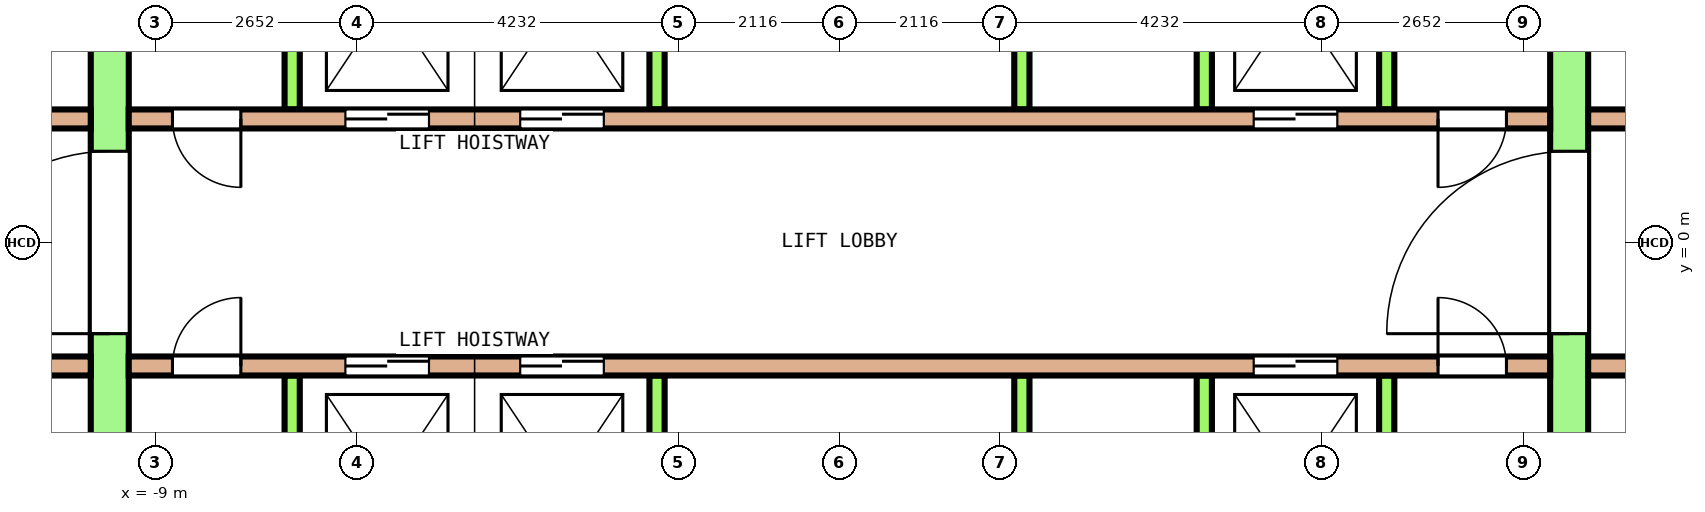
"""IFC4 building model, lengths in metres.
Left out: names, types, materials, properties, quantities, classifications, styles, units other than length and angle.
Written with IfcOpenShell. Run it as: python <this file> out.ifc"""

import sys

from ifc_helpers import new_model, si_unit, direction, frame, frame_2d, origin, place, context, subcontext, project, spatial, rectangle, extrude, element, fill, save


model = new_model("IFC4")
c1 = context("Model", 3, precision=1e-05, world=origin(), true_north=direction((0.0, 1.0)))
c2 = subcontext(c1, "Body", "Model", "MODEL_VIEW")
j1 = project(units=[si_unit("LENGTHUNIT", "METRE"), si_unit("PLANEANGLEUNIT", "RADIAN")], contexts=[c1])
p1 = place(None, origin())
s1 = spatial("IfcSite", under=j1, at=p1, CompositionType="ELEMENT")
p2 = place(p1, origin())
s2 = spatial("IfcBuilding", under=s1, at=p2, CompositionType="ELEMENT")
p3 = place(p2, frame((0.0, 0.0, 171.6)))
s3 = spatial("IfcBuildingStorey", under=s2, at=p3, CompositionType="ELEMENT", Elevation=171.6)
p4 = place(p3, frame((-9.6, -7.75, 0.0), z_axis=(0.0, 0.0, 1.0), x_axis=(0.0, 1.0, 0.0)))
e1 = element("IfcWall", 1, at=p4, inside=s3, PredefinedType="SHEAR", context=c2, shape_type="SweptSolid", body=[
    extrude(rectangle(XDim=15.5, YDim=0.5, at=frame_2d((7.75, 0.0))), origin(), (0.0, 0.0, 1.0), 4.1),
])
p5 = place(p4, frame((6.55, 0.0, 0.0)))
e2 = element("IfcOpeningElement", 2, at=p5, cuts=e1, PredefinedType="OPENING", context=c2, shape_type="SweptSolid", body=[
    extrude(rectangle(XDim=2.4, YDim=2.1, at=frame_2d((1.2, 1.05))), frame((0.0, 0.26, 0.0), z_axis=(0.0, -1.0, 0.0), x_axis=(1.0, 0.0, 0.0)), (0.0, 0.0, 1.0), 0.52),
])
p6 = place(p4, frame((13.45, 0.0, 0.0)))
e3 = element("IfcOpeningElement", 3, at=p6, cuts=e1, PredefinedType="OPENING", context=c2, shape_type="SweptSolid", body=[
    extrude(rectangle(XDim=1.2, YDim=2.1, at=frame_2d((0.6, 1.05))), frame((0.0, 0.26, 0.0), z_axis=(0.0, -1.0, 0.0), x_axis=(1.0, 0.0, 0.0)), (0.0, 0.0, 1.0), 0.52),
])
p7 = place(p4, frame((0.85, 0.0, 0.0)))
e4 = element("IfcOpeningElement", 4, at=p7, cuts=e1, PredefinedType="OPENING", context=c2, shape_type="SweptSolid", body=[
    extrude(rectangle(XDim=1.2, YDim=2.1, at=frame_2d((0.6, 1.05))), frame((0.0, 0.26, 0.0), z_axis=(0.0, -1.0, 0.0), x_axis=(1.0, 0.0, 0.0)), (0.0, 0.0, 1.0), 0.52),
])
p8 = place(p3, frame((9.6, -7.75, 0.0), z_axis=(0.0, 0.0, 1.0), x_axis=(0.0, 1.0, 0.0)))
e5 = element("IfcWall", 5, at=p8, inside=s3, PredefinedType="SHEAR", context=c2, shape_type="SweptSolid", body=[
    extrude(rectangle(XDim=15.5, YDim=0.5, at=frame_2d((7.75, 0.0))), origin(), (0.0, 0.0, 1.0), 4.1),
])
p9 = place(p8, frame((6.55, 0.0, 0.0)))
e6 = element("IfcOpeningElement", 6, at=p9, cuts=e5, PredefinedType="OPENING", context=c2, shape_type="SweptSolid", body=[
    extrude(rectangle(XDim=2.4, YDim=2.1, at=frame_2d((1.2, 1.05))), frame((0.0, 0.26, 0.0), z_axis=(0.0, -1.0, 0.0), x_axis=(1.0, 0.0, 0.0)), (0.0, 0.0, 1.0), 0.52),
])
p10 = place(p8, frame((13.45, 0.0, 0.0)))
e7 = element("IfcOpeningElement", 7, at=p10, cuts=e5, PredefinedType="OPENING", context=c2, shape_type="SweptSolid", body=[
    extrude(rectangle(XDim=1.2, YDim=2.1, at=frame_2d((0.6, 1.05))), frame((0.0, 0.26, 0.0), z_axis=(0.0, -1.0, 0.0), x_axis=(1.0, 0.0, 0.0)), (0.0, 0.0, 1.0), 0.52),
])
p11 = place(p8, frame((0.95, 0.0, 0.0)))
e8 = element("IfcOpeningElement", 8, at=p11, cuts=e5, PredefinedType="OPENING", context=c2, shape_type="SweptSolid", body=[
    extrude(rectangle(XDim=1.0, YDim=2.1, at=frame_2d((0.5, 1.05))), frame((0.0, 0.26, 0.0), z_axis=(0.0, -1.0, 0.0), x_axis=(1.0, 0.0, 0.0)), (0.0, 0.0, 1.0), 0.52),
])
p12 = place(p3, frame((-12.85, 1.625, 0.0), z_axis=(0.0, 0.0, 1.0), x_axis=(1.0, 0.0, 0.0)))
e9 = element("IfcWall", 9, at=p12, inside=s3, PredefinedType="SOLIDWALL", context=c2, shape_type="SweptSolid", body=[
    extrude(rectangle(XDim=3.0, YDim=0.25, at=frame_2d((1.5, 0.0))), origin(), (0.0, 0.0, 1.0), 4.1),
])
p13 = place(p12, frame((1.05, 0.0, 0.0)))
e10 = element("IfcOpeningElement", 10, at=p13, cuts=e9, PredefinedType="OPENING", context=c2, shape_type="SweptSolid", body=[
    extrude(rectangle(XDim=0.9, YDim=2.1, at=frame_2d((0.45, 1.05))), frame((0.0, 0.135, 0.0), z_axis=(0.0, -1.0, 0.0), x_axis=(1.0, 0.0, 0.0)), (0.0, 0.0, 1.0), 0.27),
])
p14 = place(p3, frame((-9.35, 1.625, 0.0), z_axis=(0.0, 0.0, 1.0), x_axis=(1.0, 0.0, 0.0)))
e11 = element("IfcWall", 11, at=p14, inside=s3, PredefinedType="SOLIDWALL", context=c2, shape_type="SweptSolid", body=[
    extrude(rectangle(XDim=18.7, YDim=0.25, at=frame_2d((9.35, 0.0))), origin(), (0.0, 0.0, 1.0), 4.1),
])
p15 = place(p14, frame((2.85, 0.0, 0.0)))
e12 = element("IfcOpeningElement", 12, at=p15, cuts=e11, PredefinedType="OPENING", context=c2, shape_type="SweptSolid", body=[
    extrude(rectangle(XDim=1.1, YDim=2.1, at=frame_2d((0.55, 1.05))), frame((0.0, 0.135, 0.0), z_axis=(0.0, -1.0, 0.0), x_axis=(1.0, 0.0, 0.0)), (0.0, 0.0, 1.0), 0.27),
])
p16 = place(p14, frame((5.15, 0.0, 0.0)))
e13 = element("IfcOpeningElement", 13, at=p16, cuts=e11, PredefinedType="OPENING", context=c2, shape_type="SweptSolid", body=[
    extrude(rectangle(XDim=1.1, YDim=2.1, at=frame_2d((0.55, 1.05))), frame((0.0, 0.135, 0.0), z_axis=(0.0, -1.0, 0.0), x_axis=(1.0, 0.0, 0.0)), (0.0, 0.0, 1.0), 0.27),
])
p17 = place(p14, frame((14.8, 0.0, 0.0)))
e14 = element("IfcOpeningElement", 14, at=p17, cuts=e11, PredefinedType="OPENING", context=c2, shape_type="SweptSolid", body=[
    extrude(rectangle(XDim=1.1, YDim=2.1, at=frame_2d((0.55, 1.05))), frame((0.0, 0.135, 0.0), z_axis=(0.0, -1.0, 0.0), x_axis=(1.0, 0.0, 0.0)), (0.0, 0.0, 1.0), 0.27),
])
p18 = place(p14, frame((0.575, 0.0, 0.0)))
e15 = element("IfcOpeningElement", 15, at=p18, cuts=e11, PredefinedType="OPENING", context=c2, shape_type="SweptSolid", body=[
    extrude(rectangle(XDim=0.9, YDim=2.1, at=frame_2d((0.45, 1.05))), frame((0.0, 0.135, 0.0), z_axis=(0.0, -1.0, 0.0), x_axis=(1.0, 0.0, 0.0)), (0.0, 0.0, 1.0), 0.27),
])
p19 = place(p14, frame((17.225, 0.0, 0.0)))
e16 = element("IfcOpeningElement", 16, at=p19, cuts=e11, PredefinedType="OPENING", context=c2, shape_type="SweptSolid", body=[
    extrude(rectangle(XDim=0.9, YDim=2.1, at=frame_2d((0.45, 1.05))), frame((0.0, 0.135, 0.0), z_axis=(0.0, -1.0, 0.0), x_axis=(1.0, 0.0, 0.0)), (0.0, 0.0, 1.0), 0.27),
])
p20 = place(p3, frame((9.85, 1.625, 0.0), z_axis=(0.0, 0.0, 1.0), x_axis=(1.0, 0.0, 0.0)))
e17 = element("IfcWall", 17, at=p20, inside=s3, PredefinedType="SOLIDWALL", context=c2, shape_type="SweptSolid", body=[
    extrude(rectangle(XDim=3.0, YDim=0.25, at=frame_2d((1.5, 0.0))), origin(), (0.0, 0.0, 1.0), 4.1),
])
p21 = place(p20, frame((1.05, 0.0, 0.0)))
e18 = element("IfcOpeningElement", 18, at=p21, cuts=e17, PredefinedType="OPENING", context=c2, shape_type="SweptSolid", body=[
    extrude(rectangle(XDim=0.9, YDim=2.1, at=frame_2d((0.45, 1.05))), frame((0.0, 0.135, 0.0), z_axis=(0.0, -1.0, 0.0), x_axis=(1.0, 0.0, 0.0)), (0.0, 0.0, 1.0), 0.27),
])
for number, where, z_axis, x_axis in (
    (19, (-7.2, 1.75, 0.0), (0.0, 0.0, 1.0), (0.0, 1.0, 0.0)),
    (20, (-2.4, 1.75, 0.0), (0.0, 0.0, 1.0), (0.0, 1.0, 0.0)),
    (21, (2.4, 1.75, 0.0), (0.0, 0.0, 1.0), (0.0, 1.0, 0.0)),
    (22, (4.8, 1.75, 0.0), (0.0, 0.0, 1.0), (0.0, 1.0, 0.0)),
    (23, (7.2, 1.75, 0.0), (0.0, 0.0, 1.0), (0.0, 1.0, 0.0)),
):
    element("IfcWall", number, at=place(p3, frame(where, z_axis=z_axis, x_axis=x_axis)), inside=s3, PredefinedType="SOLIDWALL", context=c2, shape_type="SweptSolid", body=[
        extrude(rectangle(XDim=2.9, YDim=0.2, at=frame_2d((1.45, 0.0))), origin(), (0.0, 0.0, 1.0), 4.1),
    ])
p22 = place(p3, frame((-12.85, -1.625, 0.0), z_axis=(0.0, 0.0, 1.0), x_axis=(1.0, 0.0, 0.0)))
e24 = element("IfcWall", 24, at=p22, inside=s3, PredefinedType="SOLIDWALL", context=c2, shape_type="SweptSolid", body=[
    extrude(rectangle(XDim=3.0, YDim=0.25, at=frame_2d((1.5, 0.0))), origin(), (0.0, 0.0, 1.0), 4.1),
])
p23 = place(p22, frame((1.05, 0.0, 0.0)))
e25 = element("IfcOpeningElement", 25, at=p23, cuts=e24, PredefinedType="OPENING", context=c2, shape_type="SweptSolid", body=[
    extrude(rectangle(XDim=0.9, YDim=2.1, at=frame_2d((0.45, 1.05))), frame((0.0, 0.135, 0.0), z_axis=(0.0, -1.0, 0.0), x_axis=(1.0, 0.0, 0.0)), (0.0, 0.0, 1.0), 0.27),
])
p24 = place(p3, frame((-9.35, -1.625, 0.0), z_axis=(0.0, 0.0, 1.0), x_axis=(1.0, 0.0, 0.0)))
e26 = element("IfcWall", 26, at=p24, inside=s3, PredefinedType="SOLIDWALL", context=c2, shape_type="SweptSolid", body=[
    extrude(rectangle(XDim=18.7, YDim=0.25, at=frame_2d((9.35, 0.0))), origin(), (0.0, 0.0, 1.0), 4.1),
])
p25 = place(p24, frame((2.85, 0.0, 0.0)))
e27 = element("IfcOpeningElement", 27, at=p25, cuts=e26, PredefinedType="OPENING", context=c2, shape_type="SweptSolid", body=[
    extrude(rectangle(XDim=1.1, YDim=2.1, at=frame_2d((0.55, 1.05))), frame((0.0, 0.135, 0.0), z_axis=(0.0, -1.0, 0.0), x_axis=(1.0, 0.0, 0.0)), (0.0, 0.0, 1.0), 0.27),
])
p26 = place(p24, frame((5.15, 0.0, 0.0)))
e28 = element("IfcOpeningElement", 28, at=p26, cuts=e26, PredefinedType="OPENING", context=c2, shape_type="SweptSolid", body=[
    extrude(rectangle(XDim=1.1, YDim=2.1, at=frame_2d((0.55, 1.05))), frame((0.0, 0.135, 0.0), z_axis=(0.0, -1.0, 0.0), x_axis=(1.0, 0.0, 0.0)), (0.0, 0.0, 1.0), 0.27),
])
p27 = place(p24, frame((14.8, 0.0, 0.0)))
e29 = element("IfcOpeningElement", 29, at=p27, cuts=e26, PredefinedType="OPENING", context=c2, shape_type="SweptSolid", body=[
    extrude(rectangle(XDim=1.1, YDim=2.1, at=frame_2d((0.55, 1.05))), frame((0.0, 0.135, 0.0), z_axis=(0.0, -1.0, 0.0), x_axis=(1.0, 0.0, 0.0)), (0.0, 0.0, 1.0), 0.27),
])
p28 = place(p24, frame((0.575, 0.0, 0.0)))
e30 = element("IfcOpeningElement", 30, at=p28, cuts=e26, PredefinedType="OPENING", context=c2, shape_type="SweptSolid", body=[
    extrude(rectangle(XDim=0.9, YDim=2.1, at=frame_2d((0.45, 1.05))), frame((0.0, 0.135, 0.0), z_axis=(0.0, -1.0, 0.0), x_axis=(1.0, 0.0, 0.0)), (0.0, 0.0, 1.0), 0.27),
])
p29 = place(p24, frame((17.225, 0.0, 0.0)))
e31 = element("IfcOpeningElement", 31, at=p29, cuts=e26, PredefinedType="OPENING", context=c2, shape_type="SweptSolid", body=[
    extrude(rectangle(XDim=0.9, YDim=2.1, at=frame_2d((0.45, 1.05))), frame((0.0, 0.135, 0.0), z_axis=(0.0, -1.0, 0.0), x_axis=(1.0, 0.0, 0.0)), (0.0, 0.0, 1.0), 0.27),
])
p30 = place(p3, frame((9.85, -1.625, 0.0), z_axis=(0.0, 0.0, 1.0), x_axis=(1.0, 0.0, 0.0)))
e32 = element("IfcWall", 32, at=p30, inside=s3, PredefinedType="SOLIDWALL", context=c2, shape_type="SweptSolid", body=[
    extrude(rectangle(XDim=3.0, YDim=0.25, at=frame_2d((1.5, 0.0))), origin(), (0.0, 0.0, 1.0), 4.1),
])
p31 = place(p30, frame((1.05, 0.0, 0.0)))
e33 = element("IfcOpeningElement", 33, at=p31, cuts=e32, PredefinedType="OPENING", context=c2, shape_type="SweptSolid", body=[
    extrude(rectangle(XDim=0.9, YDim=2.1, at=frame_2d((0.45, 1.05))), frame((0.0, 0.135, 0.0), z_axis=(0.0, -1.0, 0.0), x_axis=(1.0, 0.0, 0.0)), (0.0, 0.0, 1.0), 0.27),
])
for number, where, z_axis, x_axis in (
    (34, (-7.2, -4.65, 0.0), (0.0, 0.0, 1.0), (0.0, 1.0, 0.0)),
    (35, (-2.4, -4.65, 0.0), (0.0, 0.0, 1.0), (0.0, 1.0, 0.0)),
    (36, (2.4, -4.65, 0.0), (0.0, 0.0, 1.0), (0.0, 1.0, 0.0)),
    (37, (4.8, -4.65, 0.0), (0.0, 0.0, 1.0), (0.0, 1.0, 0.0)),
    (38, (7.2, -4.65, 0.0), (0.0, 0.0, 1.0), (0.0, 1.0, 0.0)),
):
    element("IfcWall", number, at=place(p3, frame(where, z_axis=z_axis, x_axis=x_axis)), inside=s3, PredefinedType="SOLIDWALL", context=c2, shape_type="SweptSolid", body=[
        extrude(rectangle(XDim=2.9, YDim=0.2, at=frame_2d((1.45, 0.0))), origin(), (0.0, 0.0, 1.0), 4.1),
    ])
p32 = place(p15, origin())
e39 = element("IfcDoor", 39, at=p32, inside=s3, OperationType="DOUBLE_DOOR_SLIDING", PredefinedType="DOOR", context=c2, shape_type="SweptSolid", body=[
    extrude(rectangle(XDim=1.1, YDim=2.1, at=frame_2d((0.55, 1.05))), frame((0.0, 0.075, 0.0), z_axis=(0.0, -1.0, 0.0), x_axis=(1.0, 0.0, 0.0)), (0.0, 0.0, 1.0), 0.15),
])
fill(e12, e39)
p33 = place(p16, origin())
e40 = element("IfcDoor", 40, at=p33, inside=s3, OperationType="DOUBLE_DOOR_SLIDING", PredefinedType="DOOR", context=c2, shape_type="SweptSolid", body=[
    extrude(rectangle(XDim=1.1, YDim=2.1, at=frame_2d((0.55, 1.05))), frame((0.0, 0.075, 0.0), z_axis=(0.0, -1.0, 0.0), x_axis=(1.0, 0.0, 0.0)), (0.0, 0.0, 1.0), 0.15),
])
fill(e13, e40)
p34 = place(p17, origin())
e41 = element("IfcDoor", 41, at=p34, inside=s3, OperationType="DOUBLE_DOOR_SLIDING", PredefinedType="DOOR", context=c2, shape_type="SweptSolid", body=[
    extrude(rectangle(XDim=1.1, YDim=2.1, at=frame_2d((0.55, 1.05))), frame((0.0, 0.075, 0.0), z_axis=(0.0, -1.0, 0.0), x_axis=(1.0, 0.0, 0.0)), (0.0, 0.0, 1.0), 0.15),
])
fill(e14, e41)
p35 = place(p25, origin())
e42 = element("IfcDoor", 42, at=p35, inside=s3, OperationType="DOUBLE_DOOR_SLIDING", PredefinedType="DOOR", context=c2, shape_type="SweptSolid", body=[
    extrude(rectangle(XDim=1.1, YDim=2.1, at=frame_2d((0.55, 1.05))), frame((0.0, 0.075, 0.0), z_axis=(0.0, -1.0, 0.0), x_axis=(1.0, 0.0, 0.0)), (0.0, 0.0, 1.0), 0.15),
])
fill(e27, e42)
p36 = place(p26, origin())
e43 = element("IfcDoor", 43, at=p36, inside=s3, OperationType="DOUBLE_DOOR_SLIDING", PredefinedType="DOOR", context=c2, shape_type="SweptSolid", body=[
    extrude(rectangle(XDim=1.1, YDim=2.1, at=frame_2d((0.55, 1.05))), frame((0.0, 0.075, 0.0), z_axis=(0.0, -1.0, 0.0), x_axis=(1.0, 0.0, 0.0)), (0.0, 0.0, 1.0), 0.15),
])
fill(e28, e43)
p37 = place(p27, origin())
e44 = element("IfcDoor", 44, at=p37, inside=s3, OperationType="DOUBLE_DOOR_SLIDING", PredefinedType="DOOR", context=c2, shape_type="SweptSolid", body=[
    extrude(rectangle(XDim=1.1, YDim=2.1, at=frame_2d((0.55, 1.05))), frame((0.0, 0.075, 0.0), z_axis=(0.0, -1.0, 0.0), x_axis=(1.0, 0.0, 0.0)), (0.0, 0.0, 1.0), 0.15),
])
fill(e29, e44)
p38 = place(p5, origin())
e45 = element("IfcDoor", 45, at=p38, inside=s3, OperationType="DOUBLE_DOOR_SINGLE_SWING", PredefinedType="DOOR", context=c2, shape_type="SweptSolid", body=[
    extrude(rectangle(XDim=2.4, YDim=2.1, at=frame_2d((1.2, 1.05))), frame((0.0, 0.2, 0.0), z_axis=(0.0, -1.0, 0.0), x_axis=(1.0, 0.0, 0.0)), (0.0, 0.0, 1.0), 0.4),
])
fill(e2, e45)
p39 = place(p9, origin())
e46 = element("IfcDoor", 46, at=p39, inside=s3, OperationType="DOUBLE_DOOR_SINGLE_SWING", PredefinedType="DOOR", context=c2, shape_type="SweptSolid", body=[
    extrude(rectangle(XDim=2.4, YDim=2.1, at=frame_2d((1.2, 1.05))), frame((0.0, 0.2, 0.0), z_axis=(0.0, -1.0, 0.0), x_axis=(1.0, 0.0, 0.0)), (0.0, 0.0, 1.0), 0.4),
])
fill(e6, e46)
p40 = place(p18, origin())
e47 = element("IfcDoor", 47, at=p40, inside=s3, OperationType="SINGLE_SWING_RIGHT", PredefinedType="DOOR", context=c2, shape_type="SweptSolid", body=[
    extrude(rectangle(XDim=0.9, YDim=2.1, at=frame_2d((0.45, 1.05))), frame((0.0, 0.075, 0.0), z_axis=(0.0, -1.0, 0.0), x_axis=(1.0, 0.0, 0.0)), (0.0, 0.0, 1.0), 0.15),
])
fill(e15, e47)
p41 = place(p19, origin())
e48 = element("IfcDoor", 48, at=p41, inside=s3, OperationType="SINGLE_SWING_LEFT", PredefinedType="DOOR", context=c2, shape_type="SweptSolid", body=[
    extrude(rectangle(XDim=0.9, YDim=2.1, at=frame_2d((0.45, 1.05))), frame((0.0, 0.075, 0.0), z_axis=(0.0, -1.0, 0.0), x_axis=(1.0, 0.0, 0.0)), (0.0, 0.0, 1.0), 0.15),
])
fill(e16, e48)
p42 = place(p28, origin())
e49 = element("IfcDoor", 49, at=p42, inside=s3, OperationType="SINGLE_SWING_RIGHT", PredefinedType="DOOR", context=c2, shape_type="SweptSolid", body=[
    extrude(rectangle(XDim=0.9, YDim=2.1, at=frame_2d((0.45, 1.05))), frame((0.0, 0.075, 0.0), z_axis=(0.0, -1.0, 0.0), x_axis=(1.0, 0.0, 0.0)), (0.0, 0.0, 1.0), 0.15),
])
fill(e30, e49)
p43 = place(p29, origin())
e50 = element("IfcDoor", 50, at=p43, inside=s3, OperationType="SINGLE_SWING_LEFT", PredefinedType="DOOR", context=c2, shape_type="SweptSolid", body=[
    extrude(rectangle(XDim=0.9, YDim=2.1, at=frame_2d((0.45, 1.05))), frame((0.0, 0.075, 0.0), z_axis=(0.0, -1.0, 0.0), x_axis=(1.0, 0.0, 0.0)), (0.0, 0.0, 1.0), 0.15),
])
fill(e31, e50)
save(model, sys.argv[1])
